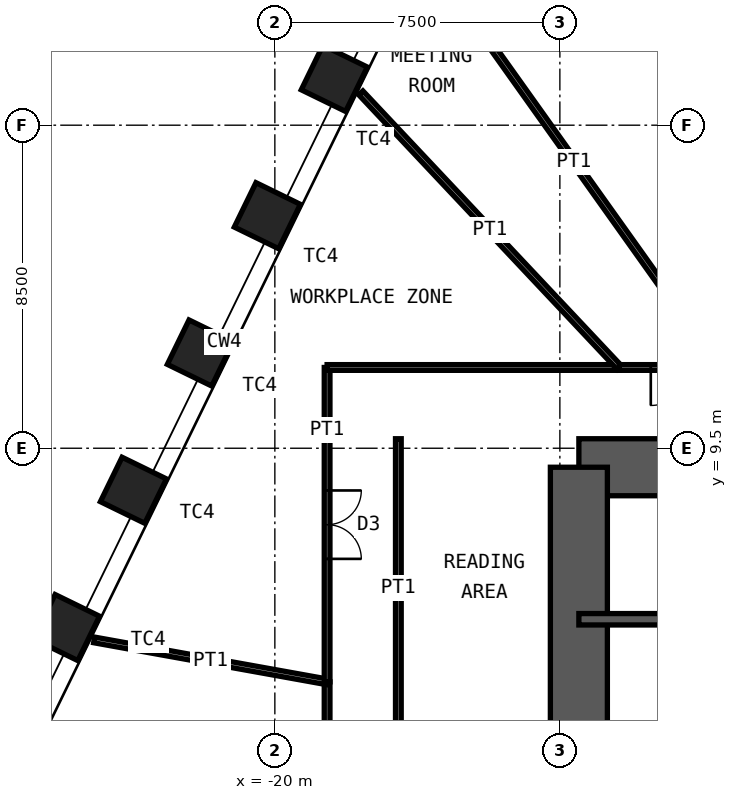
"""IFC4 building model, lengths in metres.
Left out: names, types, materials, properties, quantities, classifications, styles, units other than length and angle.
Written with IfcOpenShell. Run it as: python <this file> out.ifc"""

import sys

from ifc_helpers import new_model, si_unit, direction, frame, frame_2d, origin, origin_2d, place, context, subcontext, project, spatial, rectangle, hollow_rectangle, extrude, element, fill, save


model = new_model("IFC4")
c1 = context("Model", 3, precision=1e-05, world=origin(), true_north=direction((0.0, 1.0)))
c2 = subcontext(c1, "Body", "Model", "MODEL_VIEW")
j1 = project(units=[si_unit("LENGTHUNIT", "METRE"), si_unit("PLANEANGLEUNIT", "RADIAN")], contexts=[c1])
p1 = place(None, origin())
s1 = spatial("IfcSite", under=j1, at=p1, CompositionType="ELEMENT")
p2 = place(p1, origin())
s2 = spatial("IfcBuilding", under=s1, at=p2, CompositionType="ELEMENT")
p3 = place(p2, frame((0.0, 0.0, 157.6)))
s3 = spatial("IfcBuildingStorey", under=s2, at=p3, CompositionType="ELEMENT", Elevation=157.6)
for number, where, z_axis, x_axis in (
    (1, (-25.483, 4.781, 0.0), (0.0, 0.0, 1.0), (-0.438, -0.899, 0.0)),
    (2, (-23.721, 8.394, 0.0), (0.0, 0.0, 1.0), (-0.438, -0.899, 0.0)),
    (3, (-21.959, 12.006, 0.0), (0.0, 0.0, 1.0), (-0.438, -0.899, 0.0)),
    (4, (-20.198, 15.618, 0.0), (0.0, 0.0, 1.0), (-0.438, -0.899, 0.0)),
    (5, (-18.436, 19.23, 0.0), (0.0, 0.0, 1.0), (-0.438, -0.899, 0.0)),
):
    element("IfcColumn", number, at=place(p3, frame(where, z_axis=z_axis, x_axis=x_axis)), inside=s3, PredefinedType="COLUMN", context=c2, shape_type="SweptSolid", body=[
        extrude(hollow_rectangle(XDim=1.3, YDim=1.3, WallThickness=0.1, at=origin_2d()), origin(), (0.0, 0.0, 1.0), 4.2),
    ])
p4 = place(p3, frame((-12.0, 9.0, 0.0), z_axis=(0.0, 0.0, 1.0), x_axis=(1.0, 0.0, 0.0)))
e6 = element("IfcWall", 6, at=p4, inside=s3, PredefinedType="SHEAR", context=c2, shape_type="SweptSolid", body=[
    extrude(rectangle(XDim=24.0, YDim=1.5, at=frame_2d((12.0, 0.0))), origin(), (0.0, 0.0, 1.0), 4.2),
])
p5 = place(p4, frame((10.4, 0.0, 0.0)))
e7 = element("IfcOpeningElement", 7, at=p5, cuts=e6, PredefinedType="OPENING", context=c2, shape_type="SweptSolid", body=[
    extrude(rectangle(XDim=1.0, YDim=2.1, at=frame_2d((0.5, 1.05))), frame((0.0, 0.76, 0.0), z_axis=(0.0, -1.0, 0.0), x_axis=(1.0, 0.0, 0.0)), (0.0, 0.0, 1.0), 1.52),
])
p6 = place(p4, frame((17.6, 0.0, 0.0)))
e8 = element("IfcOpeningElement", 8, at=p6, cuts=e6, PredefinedType="OPENING", context=c2, shape_type="SweptSolid", body=[
    extrude(rectangle(XDim=0.9, YDim=2.1, at=frame_2d((0.45, 1.05))), frame((0.0, 0.76, 0.0), z_axis=(0.0, -1.0, 0.0), x_axis=(1.0, 0.0, 0.0)), (0.0, 0.0, 1.0), 1.52),
])
p7 = place(p4, frame((21.9, 0.0, 0.0)))
e9 = element("IfcOpeningElement", 9, at=p7, cuts=e6, PredefinedType="OPENING", context=c2, shape_type="SweptSolid", body=[
    extrude(rectangle(XDim=0.9, YDim=2.1, at=frame_2d((0.45, 1.05))), frame((0.0, 0.76, 0.0), z_axis=(0.0, -1.0, 0.0), x_axis=(1.0, 0.0, 0.0)), (0.0, 0.0, 1.0), 1.52),
])
p8 = place(p3, frame((-12.0, -9.0, 0.0), z_axis=(0.0, 0.0, 1.0), x_axis=(0.0, 1.0, 0.0)))
e10 = element("IfcWall", 10, at=p8, inside=s3, PredefinedType="SHEAR", context=c2, shape_type="SweptSolid", body=[
    extrude(rectangle(XDim=18.0, YDim=1.5, at=frame_2d((9.0, 0.0))), origin(), (0.0, 0.0, 1.0), 4.2),
])
p9 = place(p8, frame((8.1, 0.0, 0.0)))
e11 = element("IfcOpeningElement", 11, at=p9, cuts=e10, PredefinedType="OPENING", context=c2, shape_type="SweptSolid", body=[
    extrude(rectangle(XDim=1.8, YDim=2.1, at=frame_2d((0.9, 1.05))), frame((0.0, 0.76, 0.0), z_axis=(0.0, -1.0, 0.0), x_axis=(1.0, 0.0, 0.0)), (0.0, 0.0, 1.0), 1.52),
])
p10 = place(p3, frame((-12.0, 5.0, 0.0), z_axis=(0.0, 0.0, 1.0), x_axis=(1.0, 0.0, 0.0)))
e12 = element("IfcWall", 12, at=p10, inside=s3, PredefinedType="SHEAR", context=c2, shape_type="SweptSolid", body=[
    extrude(rectangle(XDim=24.0, YDim=0.3, at=frame_2d((12.0, 0.0))), origin(), (0.0, 0.0, 1.0), 4.2),
])
p11 = place(p3, frame((-18.625, -4.715, 0.0), z_axis=(0.0, 0.0, 1.0), x_axis=(0.0, 1.0, 0.0)))
e13 = element("IfcWall", 13, at=p11, inside=s3, PredefinedType="PARTITIONING", context=c2, shape_type="SweptSolid", body=[
    extrude(rectangle(XDim=8.068, YDim=0.15, at=frame_2d((4.034, 0.0))), origin(), (0.0, 0.0, 1.0), 4.03),
])
p12 = place(p11, frame((3.534, 0.0, 0.0)))
e14 = element("IfcOpeningElement", 14, at=p12, cuts=e13, PredefinedType="OPENING", context=c2, shape_type="SweptSolid", body=[
    extrude(rectangle(XDim=1.0, YDim=2.4, at=frame_2d((0.5, 1.2))), frame((0.0, 0.085, 0.0), z_axis=(0.0, -1.0, 0.0), x_axis=(1.0, 0.0, 0.0)), (0.0, 0.0, 1.0), 0.17),
])
p13 = place(p3, frame((-24.755, 4.457, 0.0), z_axis=(0.0, 0.0, 1.0), x_axis=(0.984175122587, -0.177198555524, 0.0)))
e15 = element("IfcWall", 15, at=p13, inside=s3, PredefinedType="PARTITIONING", context=c2, shape_type="SweptSolid", body=[
    extrude(rectangle(XDim=6.229, YDim=0.15, at=frame_2d((3.115, 0.0))), origin(), (0.0, 0.0, 1.0), 3.33),
])
p14 = place(p3, frame((-18.625, 3.353, 0.0), z_axis=(0.0, 0.0, 1.0), x_axis=(0.0, 1.0, 0.0)))
e16 = element("IfcWall", 16, at=p14, inside=s3, PredefinedType="PARTITIONING", context=c2, shape_type="SweptSolid", body=[
    extrude(rectangle(XDim=8.272, YDim=0.15, at=frame_2d((4.136, 0.0))), origin(), (0.0, 0.0, 1.0), 4.03),
])
p15 = place(p14, frame((3.236, 0.0, 0.0)))
e17 = element("IfcOpeningElement", 17, at=p15, cuts=e16, PredefinedType="OPENING", context=c2, shape_type="SweptSolid", body=[
    extrude(rectangle(XDim=1.8, YDim=2.4, at=frame_2d((0.9, 1.2))), frame((0.0, 0.085, 0.0), z_axis=(0.0, -1.0, 0.0), x_axis=(1.0, 0.0, 0.0)), (0.0, 0.0, 1.0), 0.17),
])
p16 = place(p3, frame((-18.625, 11.625, 0.0), z_axis=(0.0, 0.0, 1.0), x_axis=(1.0, 0.0, 0.0)))
e18 = element("IfcWall", 18, at=p16, inside=s3, PredefinedType="PARTITIONING", context=c2, shape_type="SweptSolid", body=[
    extrude(rectangle(XDim=7.686, YDim=0.15, at=frame_2d((3.843, 0.0))), origin(), (0.0, 0.0, 1.0), 4.03),
])
p17 = place(p3, frame((-17.738, 18.851, 0.0), z_axis=(0.0, 0.0, 1.0), x_axis=(0.685286406267, -0.728273672039, 0.0)))
e19 = element("IfcWall", 19, at=p17, inside=s3, PredefinedType="PARTITIONING", context=c2, shape_type="SweptSolid", body=[
    extrude(rectangle(XDim=9.922, YDim=0.15, at=frame_2d((4.961, 0.0))), origin(), (0.0, 0.0, 1.0), 3.33),
])
p18 = place(p3, frame((-10.939, 11.625, 0.0), z_axis=(0.0, 0.0, 1.0), x_axis=(1.0, 0.0, 0.0)))
e20 = element("IfcWall", 20, at=p18, inside=s3, PredefinedType="PARTITIONING", context=c2, shape_type="SweptSolid", body=[
    extrude(rectangle(XDim=2.662, YDim=0.15, at=frame_2d((1.331, 0.0))), origin(), (0.0, 0.0, 1.0), 4.03),
])
p19 = place(p18, frame((0.831, 0.0, 0.0)))
e21 = element("IfcOpeningElement", 21, at=p19, cuts=e20, PredefinedType="OPENING", context=c2, shape_type="SweptSolid", body=[
    extrude(rectangle(XDim=1.0, YDim=2.4, at=frame_2d((0.5, 1.2))), frame((0.0, 0.085, 0.0), z_axis=(0.0, -1.0, 0.0), x_axis=(1.0, 0.0, 0.0)), (0.0, 0.0, 1.0), 0.17),
])
p20 = place(p3, frame((-15.987, 22.455, 0.0), z_axis=(0.0, 0.0, 1.0), x_axis=(0.579969304452, -0.814638328274, 0.0)))
e22 = element("IfcWall", 22, at=p20, inside=s3, PredefinedType="PARTITIONING", context=c2, shape_type="SweptSolid", body=[
    extrude(rectangle(XDim=13.294, YDim=0.15, at=frame_2d((6.647, 0.0))), origin(), (0.0, 0.0, 1.0), 2.93),
])
p21 = place(p3, frame((-16.75, 1.9, 0.0), z_axis=(0.0, 0.0, 1.0), x_axis=(0.0, 1.0, 0.0)))
e23 = element("IfcWall", 23, at=p21, inside=s3, PredefinedType="PARTITIONING", context=c2, shape_type="SweptSolid", body=[
    extrude(rectangle(XDim=7.85, YDim=0.15, at=frame_2d((3.925, 0.0))), origin(), (0.0, 0.0, 1.0), 4.03),
])
p22 = place(p15, origin())
e24 = element("IfcDoor", 24, at=p22, inside=s3, OperationType="DOUBLE_DOOR_DOUBLE_SWING", PredefinedType="DOOR", context=c2, shape_type="SweptSolid", body=[
    extrude(rectangle(XDim=1.8, YDim=2.4, at=frame_2d((0.9, 1.2))), frame((0.0, 0.025, 0.0), z_axis=(0.0, -1.0, 0.0), x_axis=(1.0, 0.0, 0.0)), (0.0, 0.0, 1.0), 0.05),
])
fill(e17, e24)
p23 = place(p19, origin())
e25 = element("IfcDoor", 25, at=p23, inside=s3, OperationType="SINGLE_SWING_LEFT", PredefinedType="DOOR", context=c2, shape_type="SweptSolid", body=[
    extrude(rectangle(XDim=1.0, YDim=2.4, at=frame_2d((0.5, 1.2))), frame((0.0, 0.025, 0.0), z_axis=(0.0, -1.0, 0.0), x_axis=(1.0, 0.0, 0.0)), (0.0, 0.0, 1.0), 0.05),
])
fill(e21, e25)
save(model, sys.argv[1])
